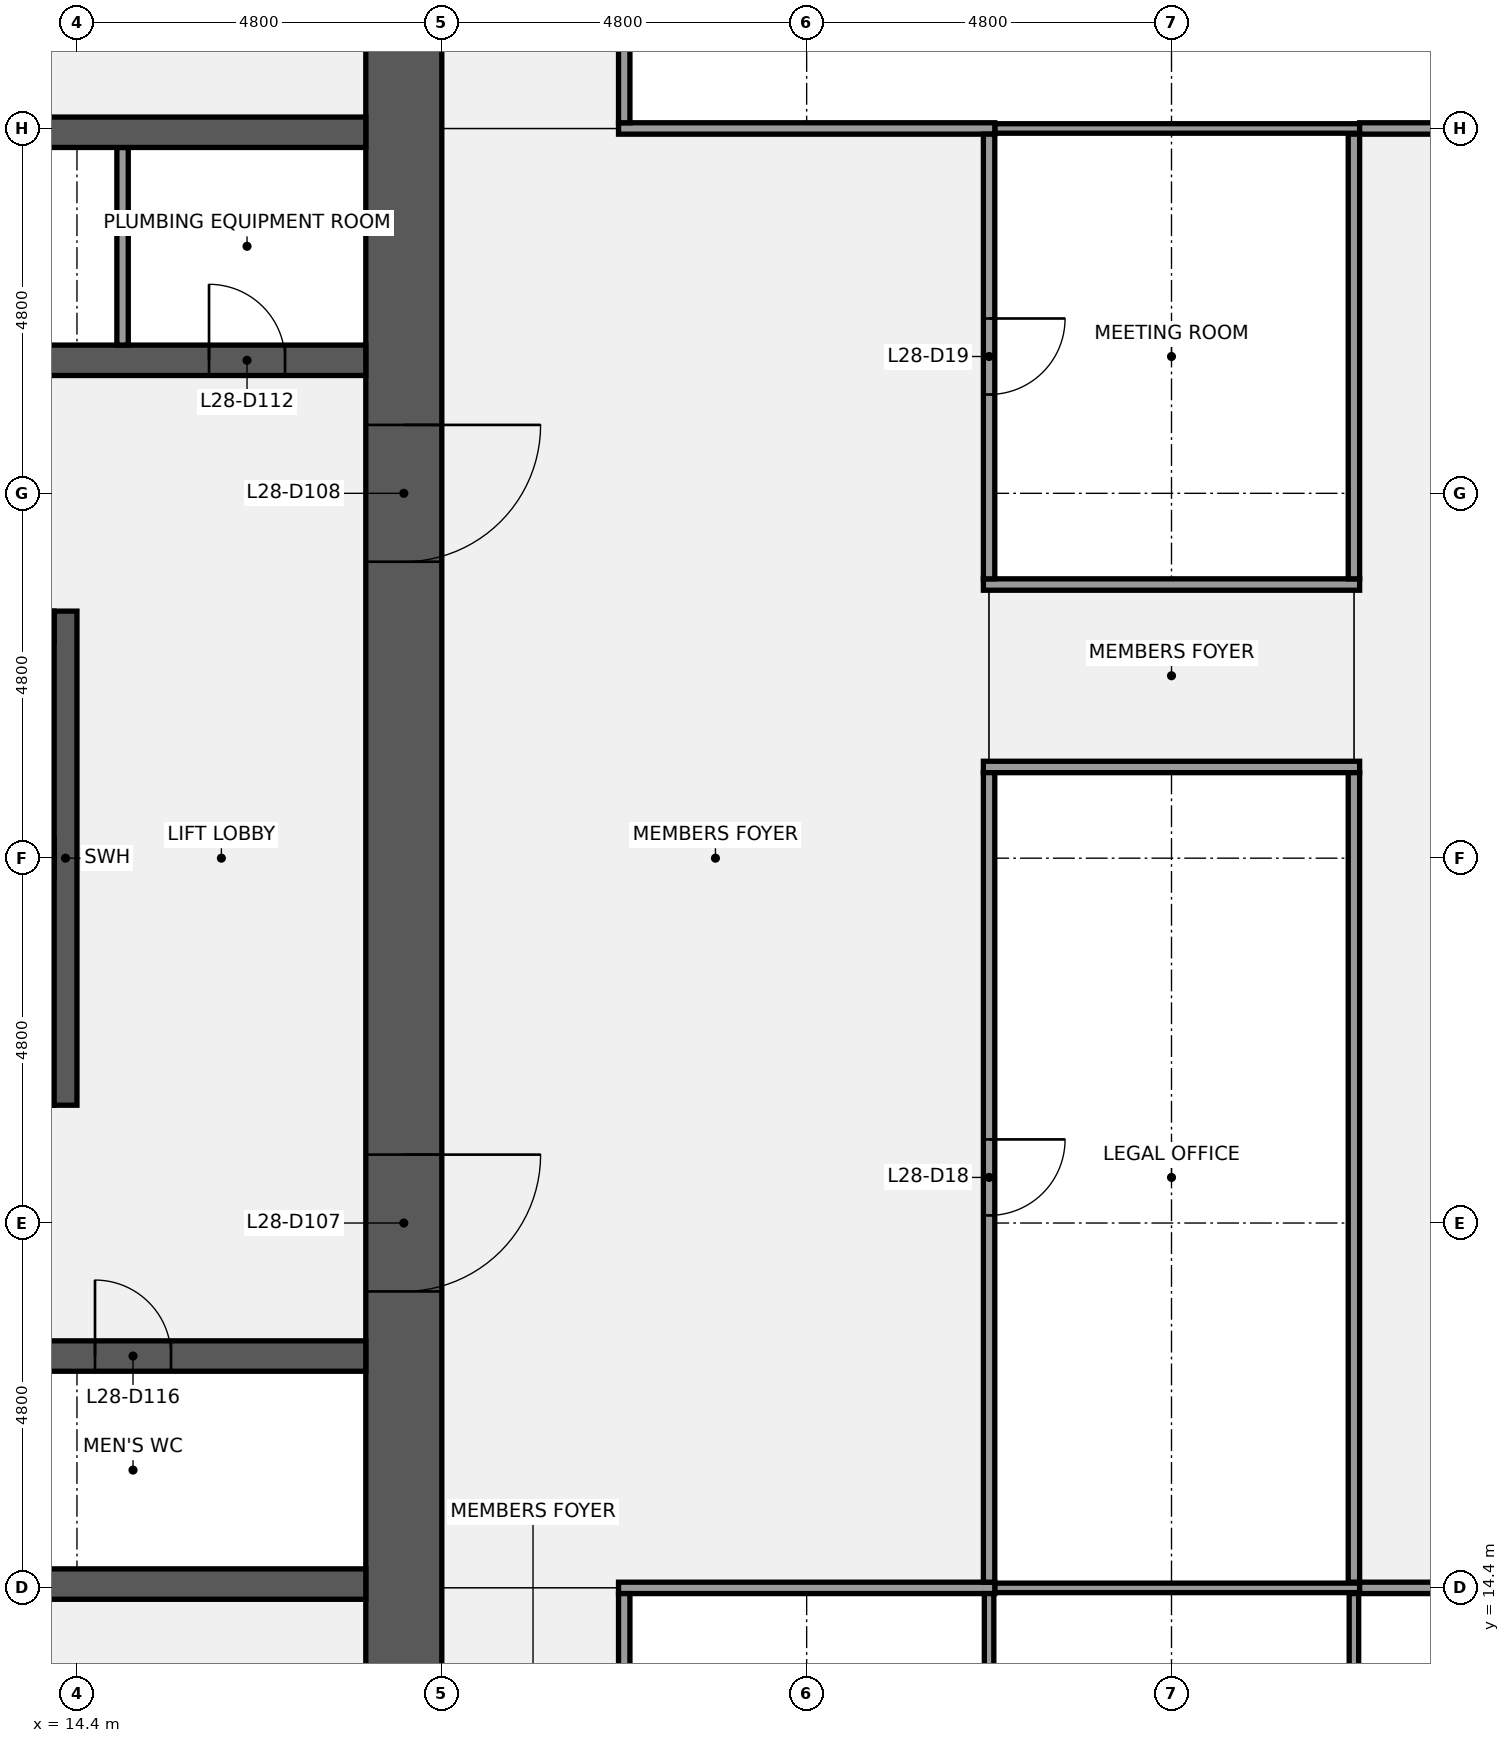
"""IFC4 building model, lengths in metres.
Left out: names, types, materials, properties, quantities, classifications, styles, units other than length and angle.
Written with IfcOpenShell. Run it as: python <this file> out.ifc"""

import sys

from ifc_helpers import new_model, si_unit, direction, frame, frame_2d, origin, place, context, subcontext, project, spatial, rectangle, extrude, element, fill, save


model = new_model("IFC4")
c1 = context("Model", 3, precision=1e-05, world=origin(), true_north=direction((0.0, 1.0)))
c2 = subcontext(c1, "Body", "Model", "MODEL_VIEW")
j1 = project(units=[si_unit("LENGTHUNIT", "METRE"), si_unit("PLANEANGLEUNIT", "RADIAN")], contexts=[c1])
p1 = place(None, origin())
s1 = spatial("IfcSite", under=j1, at=p1, CompositionType="ELEMENT")
p2 = place(p1, origin())
s2 = spatial("IfcBuilding", under=s1, at=p2, CompositionType="ELEMENT")
p3 = place(p2, frame((0.0, 0.0, 132.1)))
s3 = spatial("IfcBuildingStorey", under=s2, at=p3, CompositionType="ELEMENT", Elevation=132.1)
p4 = place(p3, frame((18.7, 38.4, 0.0), z_axis=(0.0, 0.0, 1.0), x_axis=(0.0, -1.0, 0.0)))
e1 = element("IfcWall", 1, at=p4, inside=s3, PredefinedType="SHEAR", context=c2, shape_type="SweptSolid", body=[
    extrude(rectangle(XDim=28.8, YDim=1.0, at=frame_2d((14.4, 0.0))), origin(), (0.0, 0.0, 1.0), 3.84),
])
p5 = place(p4, frame((18.3, 0.0, 0.0)))
e2 = element("IfcOpeningElement", 2, at=p5, cuts=e1, PredefinedType="OPENING", context=c2, shape_type="SweptSolid", body=[
    extrude(rectangle(XDim=1.8, YDim=2.1, at=frame_2d((0.9, 1.05))), frame((0.0, 0.51, 0.0), z_axis=(0.0, -1.0, 0.0), x_axis=(1.0, 0.0, 0.0)), (0.0, 0.0, 1.0), 1.02),
])
p6 = place(p4, frame((8.7, 0.0, 0.0)))
e3 = element("IfcOpeningElement", 3, at=p6, cuts=e1, PredefinedType="OPENING", context=c2, shape_type="SweptSolid", body=[
    extrude(rectangle(XDim=1.8, YDim=2.1, at=frame_2d((0.9, 1.05))), frame((0.0, 0.51, 0.0), z_axis=(0.0, -1.0, 0.0), x_axis=(1.0, 0.0, 0.0)), (0.0, 0.0, 1.0), 1.02),
])
p7 = place(p3, frame((1.0, 14.45, 0.0), z_axis=(0.0, 0.0, 1.0), x_axis=(1.0, 0.0, 0.0)))
e4 = element("IfcWall", 4, at=p7, inside=s3, PredefinedType="SHEAR", context=c2, shape_type="SweptSolid", body=[
    extrude(rectangle(XDim=17.2, YDim=0.4, at=frame_2d((8.6, 0.0))), origin(), (0.0, 0.0, 1.0), 3.84),
])
p8 = place(p3, frame((1.0, 17.45, 0.0), z_axis=(0.0, 0.0, 1.0), x_axis=(1.0, 0.0, 0.0)))
e5 = element("IfcWall", 5, at=p8, inside=s3, PredefinedType="SHEAR", context=c2, shape_type="SweptSolid", body=[
    extrude(rectangle(XDim=17.2, YDim=0.4, at=frame_2d((8.6, 0.0))), origin(), (0.0, 0.0, 1.0), 3.84),
])
p9 = place(p8, frame((0.762, 0.0, 0.0)))
e6 = element("IfcOpeningElement", 6, at=p9, cuts=e5, PredefinedType="OPENING", context=c2, shape_type="SweptSolid", body=[
    extrude(rectangle(XDim=1.0, YDim=2.1, at=frame_2d((0.5, 1.05))), frame((0.0, 0.21, 0.0), z_axis=(0.0, -1.0, 0.0), x_axis=(1.0, 0.0, 0.0)), (0.0, 0.0, 1.0), 0.42),
])
p10 = place(p8, frame((4.2, 0.0, 0.0)))
e7 = element("IfcOpeningElement", 7, at=p10, cuts=e5, PredefinedType="OPENING", context=c2, shape_type="SweptSolid", body=[
    extrude(rectangle(XDim=1.0, YDim=2.1, at=frame_2d((0.5, 1.05))), frame((0.0, 0.21, 0.0), z_axis=(0.0, -1.0, 0.0), x_axis=(1.0, 0.0, 0.0)), (0.0, 0.0, 1.0), 0.42),
])
p11 = place(p8, frame((8.4, 0.0, 0.0)))
e8 = element("IfcOpeningElement", 8, at=p11, cuts=e5, PredefinedType="OPENING", context=c2, shape_type="SweptSolid", body=[
    extrude(rectangle(XDim=1.0, YDim=2.1, at=frame_2d((0.5, 1.05))), frame((0.0, 0.21, 0.0), z_axis=(0.0, -1.0, 0.0), x_axis=(1.0, 0.0, 0.0)), (0.0, 0.0, 1.0), 0.42),
])
p12 = place(p8, frame((13.637, 0.0, 0.0)))
e9 = element("IfcOpeningElement", 9, at=p12, cuts=e5, PredefinedType="OPENING", context=c2, shape_type="SweptSolid", body=[
    extrude(rectangle(XDim=1.0, YDim=2.1, at=frame_2d((0.5, 1.05))), frame((0.0, 0.21, 0.0), z_axis=(0.0, -1.0, 0.0), x_axis=(1.0, 0.0, 0.0)), (0.0, 0.0, 1.0), 0.42),
])
p13 = place(p3, frame((1.0, 20.95, 0.0), z_axis=(0.0, 0.0, 1.0), x_axis=(1.0, 0.0, 0.0)))
e10 = element("IfcWall", 10, at=p13, inside=s3, PredefinedType="SHEAR", context=c2, shape_type="SweptSolid", body=[
    extrude(rectangle(XDim=13.1, YDim=0.4, at=frame_2d((6.55, 0.0))), origin(), (0.0, 0.0, 1.0), 3.84),
])
p14 = place(p13, frame((5.85, 0.0, 0.0)))
e11 = element("IfcOpeningElement", 11, at=p14, cuts=e10, PredefinedType="OPENING", context=c2, shape_type="SweptSolid", body=[
    extrude(rectangle(XDim=1.1, YDim=2.1, at=frame_2d((0.55, 1.05))), frame((0.0, 0.21, 0.0), z_axis=(0.0, -1.0, 0.0), x_axis=(1.0, 0.0, 0.0)), (0.0, 0.0, 1.0), 0.42),
])
p15 = place(p13, frame((10.8, 0.0, 0.0)))
e12 = element("IfcOpeningElement", 12, at=p15, cuts=e10, PredefinedType="OPENING", context=c2, shape_type="SweptSolid", body=[
    extrude(rectangle(XDim=1.0, YDim=2.1, at=frame_2d((0.5, 1.05))), frame((0.0, 0.21, 0.0), z_axis=(0.0, -1.0, 0.0), x_axis=(1.0, 0.0, 0.0)), (0.0, 0.0, 1.0), 0.42),
])
p16 = place(p3, frame((14.25, 20.75, 0.0), z_axis=(0.0, 0.0, 1.0), x_axis=(0.0, 1.0, 0.0)))
e13 = element("IfcWall", 13, at=p16, inside=s3, PredefinedType="SHEAR", context=c2, shape_type="SweptSolid", body=[
    extrude(rectangle(XDim=6.5, YDim=0.3, at=frame_2d((3.25, 0.0))), origin(), (0.0, 0.0, 1.0), 3.84),
])
p17 = place(p3, frame((1.0, 24.0, 0.0), z_axis=(0.0, 0.0, 1.0), x_axis=(1.0, 0.0, 0.0)))
e14 = element("IfcWall", 14, at=p17, inside=s3, PredefinedType="SHEAR", context=c2, shape_type="SweptSolid", body=[
    extrude(rectangle(XDim=13.1, YDim=0.5, at=frame_2d((6.55, 0.0))), origin(), (0.0, 0.0, 1.0), 3.84),
])
p18 = place(p3, frame((1.0, 27.05, 0.0), z_axis=(0.0, 0.0, 1.0), x_axis=(1.0, 0.0, 0.0)))
e15 = element("IfcWall", 15, at=p18, inside=s3, PredefinedType="SHEAR", context=c2, shape_type="SweptSolid", body=[
    extrude(rectangle(XDim=13.1, YDim=0.4, at=frame_2d((6.55, 0.0))), origin(), (0.0, 0.0, 1.0), 3.84),
])
p19 = place(p18, frame((1.2, 0.0, 0.0)))
e16 = element("IfcOpeningElement", 16, at=p19, cuts=e15, PredefinedType="OPENING", context=c2, shape_type="SweptSolid", body=[
    extrude(rectangle(XDim=1.2, YDim=2.1, at=frame_2d((0.6, 1.05))), frame((0.0, 0.21, 0.0), z_axis=(0.0, -1.0, 0.0), x_axis=(1.0, 0.0, 0.0)), (0.0, 0.0, 1.0), 0.42),
])
p20 = place(p18, frame((3.8, 0.0, 0.0)))
e17 = element("IfcOpeningElement", 17, at=p20, cuts=e15, PredefinedType="OPENING", context=c2, shape_type="SweptSolid", body=[
    extrude(rectangle(XDim=1.2, YDim=2.1, at=frame_2d((0.6, 1.05))), frame((0.0, 0.21, 0.0), z_axis=(0.0, -1.0, 0.0), x_axis=(1.0, 0.0, 0.0)), (0.0, 0.0, 1.0), 0.42),
])
p21 = place(p18, frame((6.4, 0.0, 0.0)))
e18 = element("IfcOpeningElement", 18, at=p21, cuts=e15, PredefinedType="OPENING", context=c2, shape_type="SweptSolid", body=[
    extrude(rectangle(XDim=1.2, YDim=2.1, at=frame_2d((0.6, 1.05))), frame((0.0, 0.21, 0.0), z_axis=(0.0, -1.0, 0.0), x_axis=(1.0, 0.0, 0.0)), (0.0, 0.0, 1.0), 0.42),
])
p22 = place(p18, frame((10.4, 0.0, 0.0)))
e19 = element("IfcOpeningElement", 19, at=p22, cuts=e15, PredefinedType="OPENING", context=c2, shape_type="SweptSolid", body=[
    extrude(rectangle(XDim=1.2, YDim=2.1, at=frame_2d((0.6, 1.05))), frame((0.0, 0.21, 0.0), z_axis=(0.0, -1.0, 0.0), x_axis=(1.0, 0.0, 0.0)), (0.0, 0.0, 1.0), 0.42),
])
p23 = place(p3, frame((1.0, 30.55, 0.0), z_axis=(0.0, 0.0, 1.0), x_axis=(1.0, 0.0, 0.0)))
e20 = element("IfcWall", 20, at=p23, inside=s3, PredefinedType="SHEAR", context=c2, shape_type="SweptSolid", body=[
    extrude(rectangle(XDim=17.2, YDim=0.4, at=frame_2d((8.6, 0.0))), origin(), (0.0, 0.0, 1.0), 3.84),
])
p24 = place(p23, frame((1.962, 0.0, 0.0)))
e21 = element("IfcOpeningElement", 21, at=p24, cuts=e20, PredefinedType="OPENING", context=c2, shape_type="SweptSolid", body=[
    extrude(rectangle(XDim=1.0, YDim=2.1, at=frame_2d((0.5, 1.05))), frame((0.0, 0.21, 0.0), z_axis=(0.0, -1.0, 0.0), x_axis=(1.0, 0.0, 0.0)), (0.0, 0.0, 1.0), 0.42),
])
p25 = place(p23, frame((6.6, 0.0, 0.0)))
e22 = element("IfcOpeningElement", 22, at=p25, cuts=e20, PredefinedType="OPENING", context=c2, shape_type="SweptSolid", body=[
    extrude(rectangle(XDim=1.0, YDim=2.1, at=frame_2d((0.5, 1.05))), frame((0.0, 0.21, 0.0), z_axis=(0.0, -1.0, 0.0), x_axis=(1.0, 0.0, 0.0)), (0.0, 0.0, 1.0), 0.42),
])
p26 = place(p23, frame((11.1, 0.0, 0.0)))
e23 = element("IfcOpeningElement", 23, at=p26, cuts=e20, PredefinedType="OPENING", context=c2, shape_type="SweptSolid", body=[
    extrude(rectangle(XDim=1.0, YDim=2.1, at=frame_2d((0.5, 1.05))), frame((0.0, 0.21, 0.0), z_axis=(0.0, -1.0, 0.0), x_axis=(1.0, 0.0, 0.0)), (0.0, 0.0, 1.0), 0.42),
])
p27 = place(p23, frame((15.137, 0.0, 0.0)))
e24 = element("IfcOpeningElement", 24, at=p27, cuts=e20, PredefinedType="OPENING", context=c2, shape_type="SweptSolid", body=[
    extrude(rectangle(XDim=1.0, YDim=2.1, at=frame_2d((0.5, 1.05))), frame((0.0, 0.21, 0.0), z_axis=(0.0, -1.0, 0.0), x_axis=(1.0, 0.0, 0.0)), (0.0, 0.0, 1.0), 0.42),
])
p28 = place(p3, frame((15.0, 30.75, 0.0), z_axis=(0.0, 0.0, 1.0), x_axis=(0.0, 1.0, 0.0)))
e25 = element("IfcWall", 25, at=p28, inside=s3, PredefinedType="PARTITIONING", context=c2, shape_type="SweptSolid", body=[
    extrude(rectangle(XDim=2.6, YDim=0.15, at=frame_2d((1.3, 0.0))), origin(), (0.0, 0.0, 1.0), 3.84),
])
p29 = place(p3, frame((1.0, 33.55, 0.0), z_axis=(0.0, 0.0, 1.0), x_axis=(1.0, 0.0, 0.0)))
e26 = element("IfcWall", 26, at=p29, inside=s3, PredefinedType="SHEAR", context=c2, shape_type="SweptSolid", body=[
    extrude(rectangle(XDim=17.2, YDim=0.4, at=frame_2d((8.6, 0.0))), origin(), (0.0, 0.0, 1.0), 3.84),
])
p30 = place(p3, frame((26.475, 14.4, 0.0), z_axis=(0.0, 0.0, 1.0), x_axis=(1.0, 0.0, 0.0)))
e27 = element("IfcWall", 27, at=p30, inside=s3, PredefinedType="PARTITIONING", context=c2, shape_type="SweptSolid", body=[
    extrude(rectangle(XDim=4.8, YDim=0.125, at=frame_2d((2.4, 0.0))), origin(), (0.0, 0.0, 1.0), 2.936),
])
p31 = place(p3, frame((21.525, 14.4, 0.0), z_axis=(0.0, 0.0, 1.0), x_axis=(1.0, 0.0, 0.0)))
e28 = element("IfcWall", 28, at=p31, inside=s3, PredefinedType="PARTITIONING", context=c2, shape_type="SweptSolid", body=[
    extrude(rectangle(XDim=4.95, YDim=0.15, at=frame_2d((2.475, 0.0))), origin(), (0.0, 0.0, 1.0), 2.936),
])
p32 = place(p3, frame((31.275, 14.4, 0.0), z_axis=(0.0, 0.0, 1.0), x_axis=(1.0, 0.0, 0.0)))
e29 = element("IfcWall", 29, at=p32, inside=s3, PredefinedType="PARTITIONING", context=c2, shape_type="SweptSolid", body=[
    extrude(rectangle(XDim=4.8, YDim=0.15, at=frame_2d((2.4, 0.0))), origin(), (0.0, 0.0, 1.0), 2.936),
])
for number, where, z_axis, x_axis in (
    (30, (26.325, 25.2, 0.0), (0.0, 0.0, 1.0), (1.0, 0.0, 0.0)),
    (31, (26.325, 27.6, 0.0), (0.0, 0.0, 1.0), (1.0, 0.0, 0.0)),
):
    element("IfcWall", number, at=place(p3, frame(where, z_axis=z_axis, x_axis=x_axis)), inside=s3, PredefinedType="PARTITIONING", context=c2, shape_type="SweptSolid", body=[
        extrude(rectangle(XDim=4.95, YDim=0.15, at=frame_2d((2.475, 0.0))), origin(), (0.0, 0.0, 1.0), 2.936),
    ])
p33 = place(p3, frame((26.475, 33.6, 0.0), z_axis=(0.0, 0.0, 1.0), x_axis=(1.0, 0.0, 0.0)))
e32 = element("IfcWall", 32, at=p33, inside=s3, PredefinedType="PARTITIONING", context=c2, shape_type="SweptSolid", body=[
    extrude(rectangle(XDim=4.8, YDim=0.125, at=frame_2d((2.4, 0.0))), origin(), (0.0, 0.0, 1.0), 2.936),
])
p34 = place(p3, frame((21.525, 33.6, 0.0), z_axis=(0.0, 0.0, 1.0), x_axis=(1.0, 0.0, 0.0)))
e33 = element("IfcWall", 33, at=p34, inside=s3, PredefinedType="PARTITIONING", context=c2, shape_type="SweptSolid", body=[
    extrude(rectangle(XDim=4.95, YDim=0.15, at=frame_2d((2.475, 0.0))), origin(), (0.0, 0.0, 1.0), 2.936),
])
p35 = place(p3, frame((31.275, 33.6, 0.0), z_axis=(0.0, 0.0, 1.0), x_axis=(1.0, 0.0, 0.0)))
e34 = element("IfcWall", 34, at=p35, inside=s3, PredefinedType="PARTITIONING", context=c2, shape_type="SweptSolid", body=[
    extrude(rectangle(XDim=4.8, YDim=0.15, at=frame_2d((2.4, 0.0))), origin(), (0.0, 0.0, 1.0), 2.936),
])
p36 = place(p3, frame((21.6, 9.675, 0.0), z_axis=(0.0, 0.0, 1.0), x_axis=(0.0, 1.0, 0.0)))
e35 = element("IfcWall", 35, at=p36, inside=s3, PredefinedType="PARTITIONING", context=c2, shape_type="SweptSolid", body=[
    extrude(rectangle(XDim=4.65, YDim=0.15, at=frame_2d((2.325, 0.0))), origin(), (0.0, 0.0, 1.0), 2.936),
])
p37 = place(p36, frame((1.825, 0.0, 0.0)))
e36 = element("IfcOpeningElement", 36, at=p37, cuts=e35, PredefinedType="OPENING", context=c2, shape_type="SweptSolid", body=[
    extrude(rectangle(XDim=1.0, YDim=2.1, at=frame_2d((0.5, 1.05))), frame((0.0, 0.085, 0.0), z_axis=(0.0, -1.0, 0.0), x_axis=(1.0, 0.0, 0.0)), (0.0, 0.0, 1.0), 0.17),
])
p38 = place(p3, frame((21.6, 33.675, 0.0), z_axis=(0.0, 0.0, 1.0), x_axis=(0.0, 1.0, 0.0)))
e37 = element("IfcWall", 37, at=p38, inside=s3, PredefinedType="PARTITIONING", context=c2, shape_type="SweptSolid", body=[
    extrude(rectangle(XDim=4.65, YDim=0.15, at=frame_2d((2.325, 0.0))), origin(), (0.0, 0.0, 1.0), 2.936),
])
p39 = place(p3, frame((26.4, 9.675, 0.0), z_axis=(0.0, 0.0, 1.0), x_axis=(0.0, 1.0, 0.0)))
e38 = element("IfcWall", 38, at=p39, inside=s3, PredefinedType="PARTITIONING", context=c2, shape_type="SweptSolid", body=[
    extrude(rectangle(XDim=4.65, YDim=0.125, at=frame_2d((2.325, 0.0))), origin(), (0.0, 0.0, 1.0), 2.936),
])
p40 = place(p3, frame((26.4, 14.475, 0.0), z_axis=(0.0, 0.0, 1.0), x_axis=(0.0, 1.0, 0.0)))
e39 = element("IfcWall", 39, at=p40, inside=s3, PredefinedType="PARTITIONING", context=c2, shape_type="SweptSolid", body=[
    extrude(rectangle(XDim=10.65, YDim=0.15, at=frame_2d((5.325, 0.0))), origin(), (0.0, 0.0, 1.0), 2.936),
])
p41 = place(p40, frame((4.825, 0.0, 0.0)))
e40 = element("IfcOpeningElement", 40, at=p41, cuts=e39, PredefinedType="OPENING", context=c2, shape_type="SweptSolid", body=[
    extrude(rectangle(XDim=1.0, YDim=2.1, at=frame_2d((0.5, 1.05))), frame((0.0, 0.085, 0.0), z_axis=(0.0, -1.0, 0.0), x_axis=(1.0, 0.0, 0.0)), (0.0, 0.0, 1.0), 0.17),
])
p42 = place(p3, frame((26.4, 27.675, 0.0), z_axis=(0.0, 0.0, 1.0), x_axis=(0.0, 1.0, 0.0)))
e41 = element("IfcWall", 41, at=p42, inside=s3, PredefinedType="PARTITIONING", context=c2, shape_type="SweptSolid", body=[
    extrude(rectangle(XDim=5.85, YDim=0.15, at=frame_2d((2.925, 0.0))), origin(), (0.0, 0.0, 1.0), 2.936),
])
p43 = place(p42, frame((2.425, 0.0, 0.0)))
e42 = element("IfcOpeningElement", 42, at=p43, cuts=e41, PredefinedType="OPENING", context=c2, shape_type="SweptSolid", body=[
    extrude(rectangle(XDim=1.0, YDim=2.1, at=frame_2d((0.5, 1.05))), frame((0.0, 0.085, 0.0), z_axis=(0.0, -1.0, 0.0), x_axis=(1.0, 0.0, 0.0)), (0.0, 0.0, 1.0), 0.17),
])
p44 = place(p3, frame((31.2, 9.675, 0.0), z_axis=(0.0, 0.0, 1.0), x_axis=(0.0, 1.0, 0.0)))
e43 = element("IfcWall", 43, at=p44, inside=s3, PredefinedType="PARTITIONING", context=c2, shape_type="SweptSolid", body=[
    extrude(rectangle(XDim=4.65, YDim=0.125, at=frame_2d((2.325, 0.0))), origin(), (0.0, 0.0, 1.0), 2.936),
])
p45 = place(p3, frame((31.2, 14.475, 0.0), z_axis=(0.0, 0.0, 1.0), x_axis=(0.0, 1.0, 0.0)))
e44 = element("IfcWall", 44, at=p45, inside=s3, PredefinedType="PARTITIONING", context=c2, shape_type="SweptSolid", body=[
    extrude(rectangle(XDim=10.65, YDim=0.15, at=frame_2d((5.325, 0.0))), origin(), (0.0, 0.0, 1.0), 2.936),
])
p46 = place(p3, frame((31.2, 27.675, 0.0), z_axis=(0.0, 0.0, 1.0), x_axis=(0.0, 1.0, 0.0)))
e45 = element("IfcWall", 45, at=p46, inside=s3, PredefinedType="PARTITIONING", context=c2, shape_type="SweptSolid", body=[
    extrude(rectangle(XDim=5.85, YDim=0.15, at=frame_2d((2.925, 0.0))), origin(), (0.0, 0.0, 1.0), 2.936),
])
p47 = place(p5, origin())
e46 = element("IfcDoor", 46, at=p47, inside=s3, OperationType="DOUBLE_DOOR_SINGLE_SWING", PredefinedType="DOOR", context=c2, shape_type="SweptSolid", body=[
    extrude(rectangle(XDim=1.8, YDim=2.1, at=frame_2d((0.9, 1.05))), frame((0.0, 0.025, 0.0), z_axis=(0.0, -1.0, 0.0), x_axis=(1.0, 0.0, 0.0)), (0.0, 0.0, 1.0), 0.05),
])
fill(e2, e46)
p48 = place(p6, origin())
e47 = element("IfcDoor", 47, at=p48, inside=s3, OperationType="DOUBLE_DOOR_SINGLE_SWING", PredefinedType="DOOR", context=c2, shape_type="SweptSolid", body=[
    extrude(rectangle(XDim=1.8, YDim=2.1, at=frame_2d((0.9, 1.05))), frame((0.0, 0.025, 0.0), z_axis=(0.0, -1.0, 0.0), x_axis=(1.0, 0.0, 0.0)), (0.0, 0.0, 1.0), 0.05),
])
fill(e3, e47)
p49 = place(p27, origin())
e48 = element("IfcDoor", 48, at=p49, inside=s3, OperationType="SINGLE_SWING_LEFT", PredefinedType="DOOR", context=c2, shape_type="SweptSolid", body=[
    extrude(rectangle(XDim=1.0, YDim=2.1, at=frame_2d((0.5, 1.05))), frame((0.0, 0.025, 0.0), z_axis=(0.0, -1.0, 0.0), x_axis=(1.0, 0.0, 0.0)), (0.0, 0.0, 1.0), 0.05),
])
fill(e24, e48)
p50 = place(p12, origin())
e49 = element("IfcDoor", 49, at=p50, inside=s3, OperationType="SINGLE_SWING_LEFT", PredefinedType="DOOR", context=c2, shape_type="SweptSolid", body=[
    extrude(rectangle(XDim=1.0, YDim=2.1, at=frame_2d((0.5, 1.05))), frame((0.0, 0.025, 0.0), z_axis=(0.0, -1.0, 0.0), x_axis=(1.0, 0.0, 0.0)), (0.0, 0.0, 1.0), 0.05),
])
fill(e9, e49)
p51 = place(p41, origin())
e50 = element("IfcDoor", 50, at=p51, inside=s3, OperationType="SINGLE_SWING_RIGHT", PredefinedType="DOOR", context=c2, shape_type="SweptSolid", body=[
    extrude(rectangle(XDim=1.0, YDim=2.1, at=frame_2d((0.5, 1.05))), frame((0.0, 0.025, 0.0), z_axis=(0.0, -1.0, 0.0), x_axis=(1.0, 0.0, 0.0)), (0.0, 0.0, 1.0), 0.05),
])
fill(e40, e50)
p52 = place(p43, origin())
e51 = element("IfcDoor", 51, at=p52, inside=s3, OperationType="SINGLE_SWING_RIGHT", PredefinedType="DOOR", context=c2, shape_type="SweptSolid", body=[
    extrude(rectangle(XDim=1.0, YDim=2.1, at=frame_2d((0.5, 1.05))), frame((0.0, 0.025, 0.0), z_axis=(0.0, -1.0, 0.0), x_axis=(1.0, 0.0, 0.0)), (0.0, 0.0, 1.0), 0.05),
])
fill(e42, e51)
save(model, sys.argv[1])
